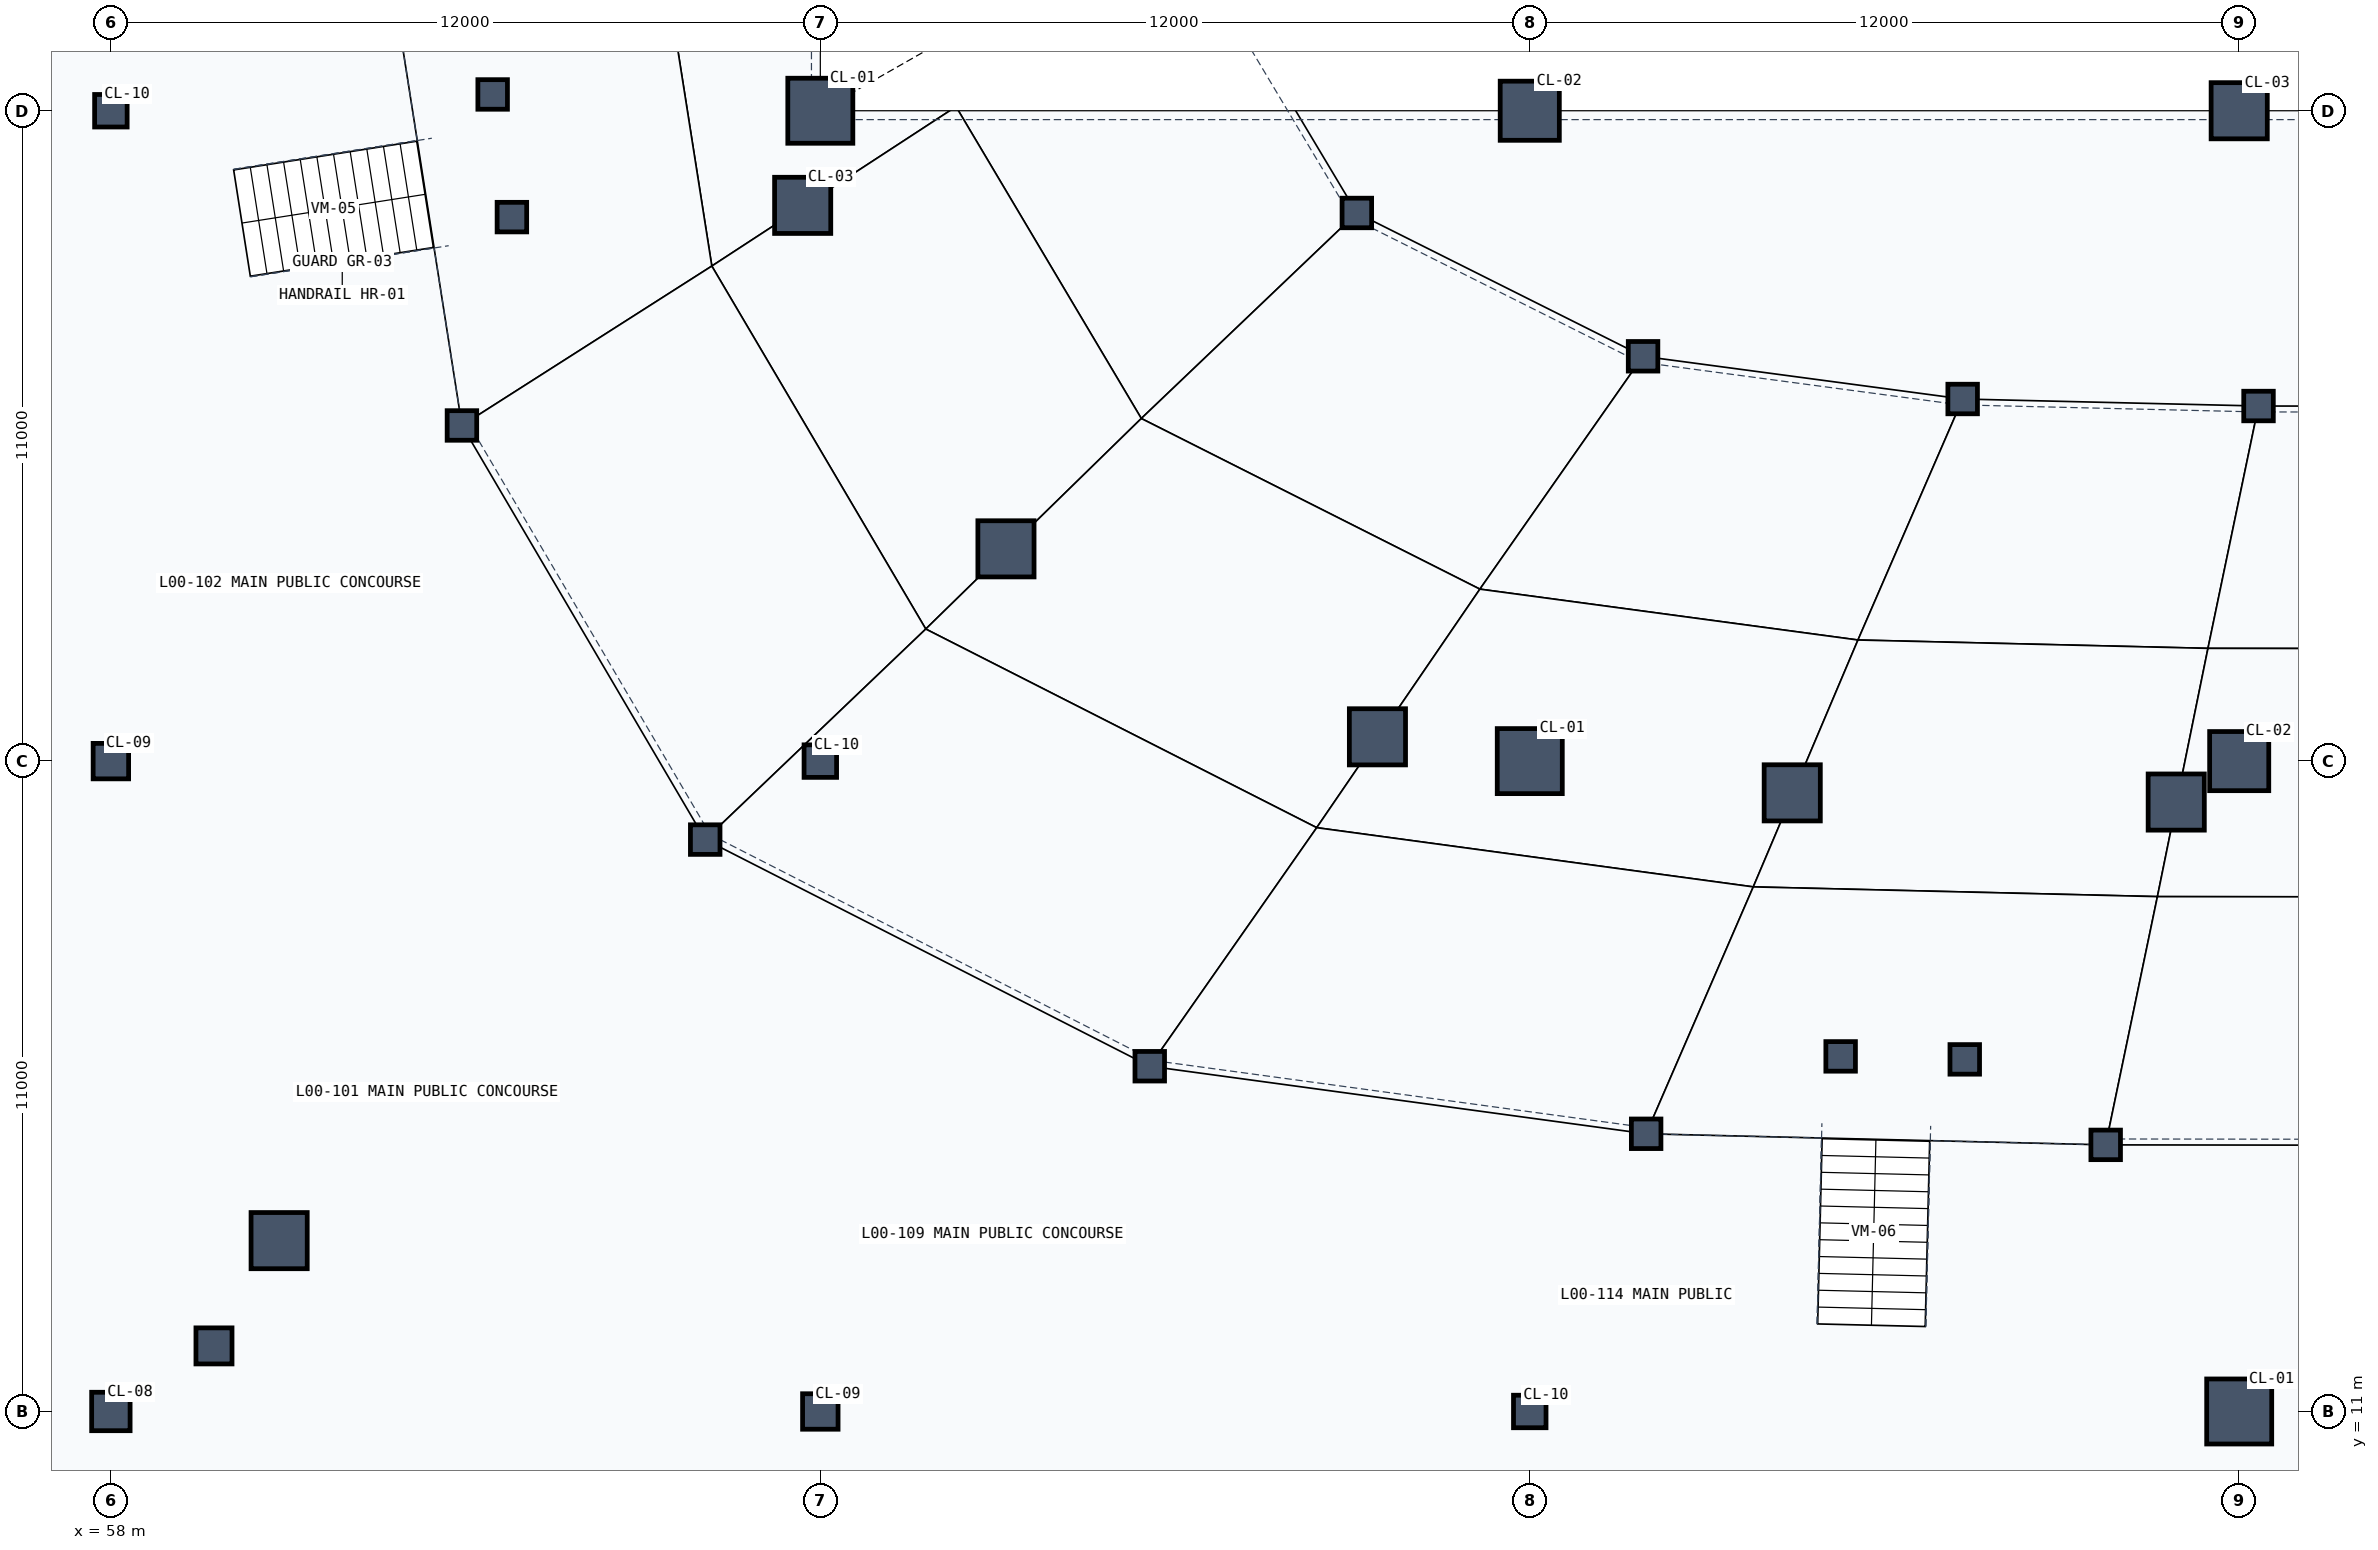
"""IFC4 building model, lengths in metres.
Left out: names, types, materials, properties, quantities, classifications, styles, units other than length and angle.
Written with IfcOpenShell. Run it as: python <this file> out.ifc"""

import sys

from ifc_helpers import new_model, si_unit, direction, frame, origin, origin_2d, place, context, subcontext, project, spatial, rectangle, hollow_circle, extrude, element, save


model = new_model("IFC4")
c1 = context("Model", 3, precision=1e-05, world=origin(), true_north=direction((0.0, 1.0)))
c2 = subcontext(c1, "Body", "Model", "MODEL_VIEW")
j1 = project(units=[si_unit("LENGTHUNIT", "METRE"), si_unit("PLANEANGLEUNIT", "RADIAN")], contexts=[c1])
p1 = place(None, origin())
s1 = spatial("IfcSite", under=j1, at=p1, CompositionType="ELEMENT")
p2 = place(p1, origin())
s2 = spatial("IfcBuilding", under=s1, at=p2, CompositionType="ELEMENT")
p3 = place(p2, origin())
s3 = spatial("IfcBuildingStorey", under=s2, at=p3, CompositionType="ELEMENT", Elevation=0.0)
p4 = place(p3, frame((58.0, 11.0, 0.0), z_axis=(0.0, 0.0, 1.0), x_axis=(1.0, 0.0, 0.0)))
e1 = element("IfcColumn", 1, at=p4, inside=s3, PredefinedType="COLUMN", context=c2, shape_type="SweptSolid", body=[
    extrude(rectangle(XDim=0.65, YDim=0.65, at=origin_2d()), origin(), (0.0, 0.0, 1.0), 5.4),
])
p5 = place(p3, frame((58.0, 22.0, 0.0), z_axis=(0.0, 0.0, 1.0), x_axis=(1.0, 0.0, 0.0)))
e2 = element("IfcColumn", 2, at=p5, inside=s3, PredefinedType="COLUMN", context=c2, shape_type="SweptSolid", body=[
    extrude(rectangle(XDim=0.6, YDim=0.6, at=origin_2d()), origin(), (0.0, 0.0, 1.0), 5.4),
])
p6 = place(p3, frame((58.0, 33.0, 0.0), z_axis=(0.0, 0.0, 1.0), x_axis=(1.0, 0.0, 0.0)))
e3 = element("IfcColumn", 3, at=p6, inside=s3, PredefinedType="COLUMN", context=c2, shape_type="SweptSolid", body=[
    extrude(rectangle(XDim=0.55, YDim=0.55, at=origin_2d()), origin(), (0.0, 0.0, 1.0), 5.4),
])
p7 = place(p3, frame((70.0, 11.0, 0.0), z_axis=(0.0, 0.0, 1.0), x_axis=(1.0, 0.0, 0.0)))
e4 = element("IfcColumn", 4, at=p7, inside=s3, PredefinedType="COLUMN", context=c2, shape_type="SweptSolid", body=[
    extrude(rectangle(XDim=0.6, YDim=0.6, at=origin_2d()), origin(), (0.0, 0.0, 1.0), 5.4),
])
p8 = place(p3, frame((70.0, 22.0, 0.0), z_axis=(0.0, 0.0, 1.0), x_axis=(1.0, 0.0, 0.0)))
e5 = element("IfcColumn", 5, at=p8, inside=s3, PredefinedType="COLUMN", context=c2, shape_type="SweptSolid", body=[
    extrude(rectangle(XDim=0.55, YDim=0.55, at=origin_2d()), origin(), (0.0, 0.0, 1.0), 5.4),
])
p9 = place(p3, frame((70.0, 33.0, 0.0), z_axis=(0.0, 0.0, 1.0), x_axis=(1.0, 0.0, 0.0)))
e6 = element("IfcColumn", 6, at=p9, inside=s3, PredefinedType="COLUMN", context=c2, shape_type="SweptSolid", body=[
    extrude(rectangle(XDim=1.1, YDim=1.1, at=origin_2d()), origin(), (0.0, 0.0, 1.0), 5.4),
])
p10 = place(p3, frame((82.0, 11.0, 0.0), z_axis=(0.0, 0.0, 1.0), x_axis=(1.0, 0.0, 0.0)))
e7 = element("IfcColumn", 7, at=p10, inside=s3, PredefinedType="COLUMN", context=c2, shape_type="SweptSolid", body=[
    extrude(rectangle(XDim=0.55, YDim=0.55, at=origin_2d()), origin(), (0.0, 0.0, 1.0), 5.4),
])
p11 = place(p3, frame((82.0, 22.0, 0.0), z_axis=(0.0, 0.0, 1.0), x_axis=(1.0, 0.0, 0.0)))
e8 = element("IfcColumn", 8, at=p11, inside=s3, PredefinedType="COLUMN", context=c2, shape_type="SweptSolid", body=[
    extrude(rectangle(XDim=1.1, YDim=1.1, at=origin_2d()), origin(), (0.0, 0.0, 1.0), 5.4),
])
p12 = place(p3, frame((82.0, 33.0, 0.0), z_axis=(0.0, 0.0, 1.0), x_axis=(1.0, 0.0, 0.0)))
e9 = element("IfcColumn", 9, at=p12, inside=s3, PredefinedType="COLUMN", context=c2, shape_type="SweptSolid", body=[
    extrude(rectangle(XDim=1.0, YDim=1.0, at=origin_2d()), origin(), (0.0, 0.0, 1.0), 5.4),
])
p13 = place(p3, frame((94.0, 11.0, 0.0), z_axis=(0.0, 0.0, 1.0), x_axis=(1.0, 0.0, 0.0)))
e10 = element("IfcColumn", 10, at=p13, inside=s3, PredefinedType="COLUMN", context=c2, shape_type="SweptSolid", body=[
    extrude(rectangle(XDim=1.1, YDim=1.1, at=origin_2d()), origin(), (0.0, 0.0, 1.0), 5.4),
])
p14 = place(p3, frame((94.0, 22.0, 0.0), z_axis=(0.0, 0.0, 1.0), x_axis=(1.0, 0.0, 0.0)))
e11 = element("IfcColumn", 11, at=p14, inside=s3, PredefinedType="COLUMN", context=c2, shape_type="SweptSolid", body=[
    extrude(rectangle(XDim=1.0, YDim=1.0, at=origin_2d()), origin(), (0.0, 0.0, 1.0), 5.4),
])
p15 = place(p3, frame((94.0, 33.0, 0.0), z_axis=(0.0, 0.0, 1.0), x_axis=(1.0, 0.0, 0.0)))
e12 = element("IfcColumn", 12, at=p15, inside=s3, PredefinedType="COLUMN", context=c2, shape_type="SweptSolid", body=[
    extrude(rectangle(XDim=0.95, YDim=0.95, at=origin_2d()), origin(), (0.0, 0.0, 1.0), 5.4),
])
p16 = place(p3, frame((59.744, 12.109, 0.0), z_axis=(0.0, 0.0, 1.0), x_axis=(1.0, 0.0, 0.0)))
e13 = element("IfcColumn", 13, at=p16, inside=s3, PredefinedType="COLUMN", context=c2, shape_type="SweptSolid", body=[
    extrude(hollow_circle(Radius=0.305, WallThickness=0.025, at=origin_2d()), origin(), (0.0, 0.0, 1.0), 5.4),
])
for number, where, z_axis, x_axis in (
    (14, (69.701, 31.4, 0.0), (0.0, 0.0, 1.0), (1.0, 0.0, 0.0)),
    (15, (73.14, 25.59, 0.0), (0.0, 0.0, 1.0), (1.0, 0.0, 0.0)),
    (16, (79.423, 22.411, 0.0), (0.0, 0.0, 1.0), (1.0, 0.0, 0.0)),
    (17, (86.44, 21.463, 0.0), (0.0, 0.0, 1.0), (1.0, 0.0, 0.0)),
    (18, (92.935, 21.308, 0.0), (0.0, 0.0, 1.0), (1.0, 0.0, 0.0)),
    (19, (60.846, 13.89, 0.0), (0.0, 0.0, 1.0), (1.0, 0.0, 0.0)),
):
    element("IfcColumn", number, at=place(p3, frame(where, z_axis=z_axis, x_axis=x_axis)), inside=s3, PredefinedType="COLUMN", context=c2, shape_type="SweptSolid", body=[
        extrude(rectangle(XDim=0.95, YDim=0.95, at=origin_2d()), origin(), (0.0, 0.0, 1.0), 5.4),
    ])
for number, where, z_axis, x_axis in (
    (20, (64.458, 33.275, 0.0), (0.0, 0.0, 1.0), (1.0, 0.0, 0.0)),
    (21, (64.783, 31.201, 0.0), (0.0, 0.0, 1.0), (1.0, 0.0, 0.0)),
):
    element("IfcColumn", number, at=place(p3, frame(where, z_axis=z_axis, x_axis=x_axis)), inside=s3, PredefinedType="COLUMN", context=c2, shape_type="SweptSolid", body=[
        extrude(rectangle(XDim=0.5, YDim=0.5, at=origin_2d()), origin(), (0.0, 0.0, 1.0), 1.05),
    ])
p17 = place(p3, frame((63.938, 27.677, 0.0), z_axis=(0.0, 0.0, 1.0), x_axis=(1.0, 0.0, 0.0)))
e22 = element("IfcColumn", 22, at=p17, inside=s3, PredefinedType="COLUMN", context=c2, shape_type="SweptSolid", body=[
    extrude(rectangle(XDim=0.5, YDim=0.5, at=origin_2d()), origin(), (0.0, 0.0, 1.0), 1.28),
])
p18 = place(p3, frame((79.075, 31.271, 0.0), z_axis=(0.0, 0.0, 1.0), x_axis=(1.0, 0.0, 0.0)))
e23 = element("IfcColumn", 23, at=p18, inside=s3, PredefinedType="COLUMN", context=c2, shape_type="SweptSolid", body=[
    extrude(rectangle(XDim=0.5, YDim=0.5, at=origin_2d()), origin(), (0.0, 0.0, 1.0), 0.55),
])
p19 = place(p3, frame((68.053, 20.673, 0.0), z_axis=(0.0, 0.0, 1.0), x_axis=(1.0, 0.0, 0.0)))
e24 = element("IfcColumn", 24, at=p19, inside=s3, PredefinedType="COLUMN", context=c2, shape_type="SweptSolid", body=[
    extrude(rectangle(XDim=0.5, YDim=0.5, at=origin_2d()), origin(), (0.0, 0.0, 1.0), 1.28),
])
p20 = place(p3, frame((83.917, 28.847, 0.0), z_axis=(0.0, 0.0, 1.0), x_axis=(1.0, 0.0, 0.0)))
e25 = element("IfcColumn", 25, at=p20, inside=s3, PredefinedType="COLUMN", context=c2, shape_type="SweptSolid", body=[
    extrude(rectangle(XDim=0.5, YDim=0.5, at=origin_2d()), origin(), (0.0, 0.0, 1.0), 0.55),
])
p21 = place(p3, frame((75.572, 16.839, 0.0), z_axis=(0.0, 0.0, 1.0), x_axis=(1.0, 0.0, 0.0)))
e26 = element("IfcColumn", 26, at=p21, inside=s3, PredefinedType="COLUMN", context=c2, shape_type="SweptSolid", body=[
    extrude(rectangle(XDim=0.5, YDim=0.5, at=origin_2d()), origin(), (0.0, 0.0, 1.0), 1.28),
])
p22 = place(p3, frame((89.322, 28.125, 0.0), z_axis=(0.0, 0.0, 1.0), x_axis=(1.0, 0.0, 0.0)))
e27 = element("IfcColumn", 27, at=p22, inside=s3, PredefinedType="COLUMN", context=c2, shape_type="SweptSolid", body=[
    extrude(rectangle(XDim=0.5, YDim=0.5, at=origin_2d()), origin(), (0.0, 0.0, 1.0), 0.55),
])
p23 = place(p3, frame((83.969, 15.697, 0.0), z_axis=(0.0, 0.0, 1.0), x_axis=(1.0, 0.0, 0.0)))
e28 = element("IfcColumn", 28, at=p23, inside=s3, PredefinedType="COLUMN", context=c2, shape_type="SweptSolid", body=[
    extrude(rectangle(XDim=0.5, YDim=0.5, at=origin_2d()), origin(), (0.0, 0.0, 1.0), 1.28),
])
for number, where, z_axis, x_axis in (
    (29, (87.258, 17.006, 0.0), (0.0, 0.0, 1.0), (1.0, 0.0, 0.0)),
    (30, (89.358, 16.955, 0.0), (0.0, 0.0, 1.0), (1.0, 0.0, 0.0)),
):
    element("IfcColumn", number, at=place(p3, frame(where, z_axis=z_axis, x_axis=x_axis)), inside=s3, PredefinedType="COLUMN", context=c2, shape_type="SweptSolid", body=[
        extrude(rectangle(XDim=0.5, YDim=0.5, at=origin_2d()), origin(), (0.0, 0.0, 1.0), 1.05),
    ])
p24 = place(p3, frame((94.327, 28.006, 0.0), z_axis=(0.0, 0.0, 1.0), x_axis=(1.0, 0.0, 0.0)))
e31 = element("IfcColumn", 31, at=p24, inside=s3, PredefinedType="COLUMN", context=c2, shape_type="SweptSolid", body=[
    extrude(rectangle(XDim=0.5, YDim=0.5, at=origin_2d()), origin(), (0.0, 0.0, 1.0), 0.55),
])
p25 = place(p3, frame((91.742, 15.509, 0.0), z_axis=(0.0, 0.0, 1.0), x_axis=(1.0, 0.0, 0.0)))
e32 = element("IfcColumn", 32, at=p25, inside=s3, PredefinedType="COLUMN", context=c2, shape_type="SweptSolid", body=[
    extrude(rectangle(XDim=0.5, YDim=0.5, at=origin_2d()), origin(), (0.0, 0.0, 1.0), 1.28),
])
save(model, sys.argv[1])
